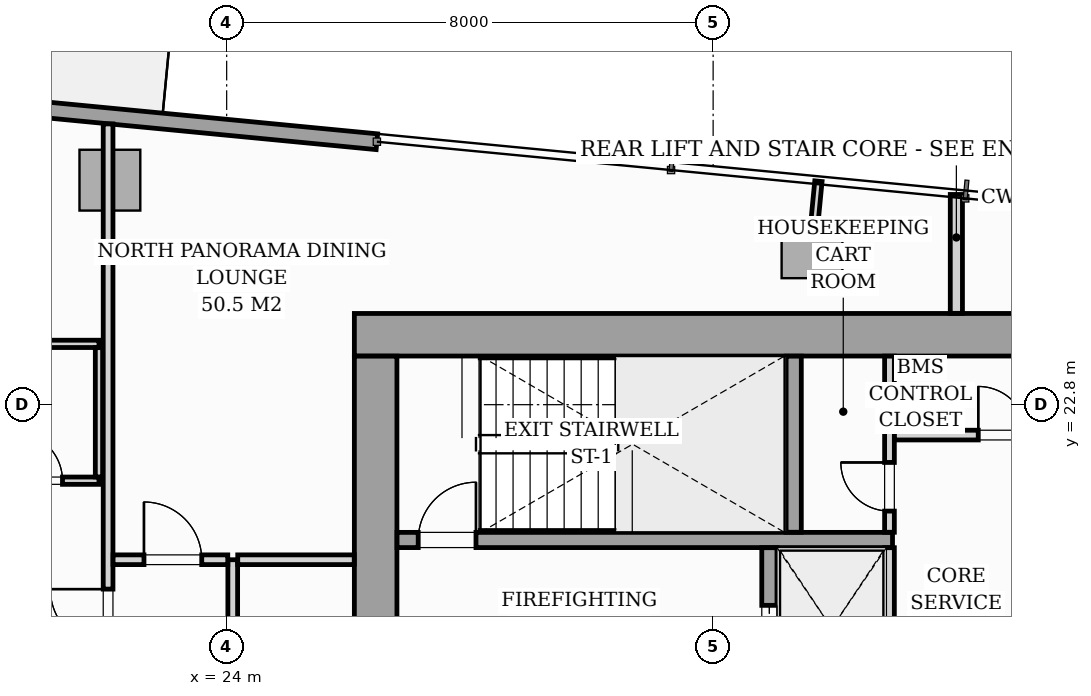
"""IFC4 building model, lengths in metres.
Left out: names, types, materials, properties, quantities, classifications, styles, units other than length and angle.
Written with IfcOpenShell. Run it as: python <this file> out.ifc"""

import sys

from ifc_helpers import new_model, si_unit, direction, frame, frame_2d, origin, origin_2d, place, context, subcontext, project, spatial, rectangle, i_section, extrude, source, transform, mapped, element, fill, save


model = new_model("IFC4")
c1 = context("Model", 3, precision=1e-05, world=origin(), true_north=direction((0.0, 1.0)))
c2 = subcontext(c1, "Body", "Model", "MODEL_VIEW")
j1 = project(units=[si_unit("LENGTHUNIT", "METRE"), si_unit("PLANEANGLEUNIT", "RADIAN")], contexts=[c1])
p1 = place(None, origin())
s1 = spatial("IfcSite", under=j1, at=p1, CompositionType="ELEMENT")
p2 = place(p1, origin())
s2 = spatial("IfcBuilding", under=s1, at=p2, CompositionType="ELEMENT")
p3 = place(p2, frame((0.0, 0.0, 156.6)))
s3 = spatial("IfcBuildingStorey", under=s2, at=p3, CompositionType="ELEMENT", Elevation=156.6)
m1 = source(origin(), c2, "Body", "SweptSolid", [
    extrude(i_section(OverallWidth=0.421, OverallDepth=0.465, WebThickness=0.045, FlangeThickness=0.073, FilletRadius=0.018, at=origin_2d()), origin(), (0.0, 0.0, 1.0), 3.196),
])
for number, where, z_axis, x_axis in (
    (1, (26.4, 24.0, 0.002), (0.0, 0.0, 1.0), (1.0, 0.0, 0.0)),
    (2, (33.12, 24.0, 0.002), (0.0, 0.0, 1.0), (1.0, 0.0, 0.0)),
):
    element("IfcColumn", number, at=place(p3, frame(where, z_axis=z_axis, x_axis=x_axis)), inside=s3, PredefinedType="PILASTER", context=c2, shape_type="MappedRepresentation", body=[
        mapped(m1, transform((0.0, 0.0, 0.0), scale=1.0)),
    ])
m2 = source(origin(), c2, "Body", "SweptSolid", [
    extrude(rectangle(XDim=1.0, YDim=1.0, at=origin_2d()), origin(), (0.0, 0.0, 1.0), 3.196),
])
for number, where, z_axis, x_axis in (
    (3, (22.08, 26.492, 0.002), (0.0, 0.0, 1.0), (0.995, -0.096, 0.0)),
    (4, (33.626, 25.38, 0.002), (0.0, 0.0, 1.0), (0.995, -0.096, 0.0)),
):
    element("IfcColumn", number, at=place(p3, frame(where, z_axis=z_axis, x_axis=x_axis)), inside=s3, PredefinedType="COLUMN", context=c2, shape_type="MappedRepresentation", body=[
        mapped(m2, transform((0.0, 0.0, 0.0), scale=1.0)),
    ])
p4 = place(p3, frame((9.539, 28.754, 0.0), z_axis=(0.0, 0.0, 1.0), x_axis=(0.995397345886, -0.09583383433, 0.0)))
e5 = element("IfcWall", 5, at=p4, inside=s3, PredefinedType="STANDARD", context=c2, shape_type="SweptSolid", body=[
    extrude(rectangle(XDim=17.01, YDim=0.26, at=frame_2d((8.505, 0.0))), origin(), (0.0, 0.0, 1.0), 2.94),
])
p5 = place(p4, frame((6.903, 0.0, 0.0)))
e6 = element("IfcOpeningElement", 6, at=p5, cuts=e5, PredefinedType="OPENING", context=c2, shape_type="SweptSolid", body=[
    extrude(rectangle(XDim=1.8, YDim=2.06, at=frame_2d((0.9, 1.03))), frame((0.0, 0.14, 0.0), z_axis=(0.0, -1.0, 0.0), x_axis=(1.0, 0.0, 0.0)), (0.0, 0.0, 1.0), 0.28),
])
p6 = place(p4, frame((2.05, 0.0, 0.65)))
e7 = element("IfcOpeningElement", 7, at=p6, cuts=e5, PredefinedType="OPENING", context=c2, shape_type="SweptSolid", body=[
    extrude(rectangle(XDim=1.6, YDim=1.5, at=frame_2d((0.8, 0.75))), frame((0.0, 0.14, 0.0), z_axis=(0.0, -1.0, 0.0), x_axis=(1.0, 0.0, 0.0)), (0.0, 0.0, 1.0), 0.28),
])
p7 = place(p3, frame((26.1, 23.95, 0.0), z_axis=(0.0, 0.0, 1.0), x_axis=(1.0, 0.0, 0.0)))
e8 = element("IfcWall", 8, at=p7, inside=s3, PredefinedType="SHEAR", context=c2, shape_type="SweptSolid", body=[
    extrude(rectangle(XDim=19.8, YDim=0.7, at=frame_2d((9.9, 0.0))), origin(), (0.0, 0.0, 1.0), 3.2),
])
p8 = place(p3, frame((26.45, 17.802, 0.0), z_axis=(0.0, 0.0, 1.0), x_axis=(0.0, 1.0, 0.0)))
e9 = element("IfcWall", 9, at=p8, inside=s3, PredefinedType="SHEAR", context=c2, shape_type="SweptSolid", body=[
    extrude(rectangle(XDim=5.796, YDim=0.7, at=frame_2d((2.898, 0.0))), origin(), (0.0, 0.0, 1.0), 3.2),
])
p9 = place(p3, frame((26.802, 20.575, 0.0), z_axis=(0.0, 0.0, 1.0), x_axis=(1.0, 0.0, 0.0)))
e10 = element("IfcWall", 10, at=p9, inside=s3, PredefinedType="SOLIDWALL", context=c2, shape_type="SweptSolid", body=[
    extrude(rectangle(XDim=8.148, YDim=0.25, at=frame_2d((4.074, 0.0))), origin(), (0.0, 0.0, 1.0), 3.2),
])
p10 = place(p9, frame((0.348, 0.0, 0.0)))
e11 = element("IfcOpeningElement", 11, at=p10, cuts=e10, PredefinedType="OPENING", context=c2, shape_type="SweptSolid", body=[
    extrude(rectangle(XDim=0.95, YDim=2.06, at=frame_2d((0.475, 1.03))), frame((0.0, 0.135, 0.0), z_axis=(0.0, -1.0, 0.0), x_axis=(1.0, 0.0, 0.0)), (0.0, 0.0, 1.0), 0.27),
])
p11 = place(p3, frame((33.325, 20.702, 0.0), z_axis=(0.0, 0.0, 1.0), x_axis=(0.0, 1.0, 0.0)))
e12 = element("IfcWall", 12, at=p11, inside=s3, PredefinedType="SOLIDWALL", context=c2, shape_type="SweptSolid", body=[
    extrude(rectangle(XDim=2.896, YDim=0.25, at=frame_2d((1.448, 0.0))), origin(), (0.0, 0.0, 1.0), 3.2),
])
p12 = place(p3, frame((32.925, 17.802, 0.0), z_axis=(0.0, 0.0, 1.0), x_axis=(0.0, 1.0, 0.0)))
e13 = element("IfcWall", 13, at=p12, inside=s3, PredefinedType="SOLIDWALL", context=c2, shape_type="SweptSolid", body=[
    extrude(rectangle(XDim=2.646, YDim=0.25, at=frame_2d((1.323, 0.0))), origin(), (0.0, 0.0, 1.0), 3.2),
])
p13 = place(p12, frame((0.598, 0.0, 0.0)))
e14 = element("IfcOpeningElement", 14, at=p13, cuts=e13, PredefinedType="OPENING", context=c2, shape_type="SweptSolid", body=[
    extrude(rectangle(XDim=1.1, YDim=2.08, at=frame_2d((0.55, 1.04))), frame((0.0, 0.135, 0.0), z_axis=(0.0, -1.0, 0.0), x_axis=(1.0, 0.0, 0.0)), (0.0, 0.0, 1.0), 0.27),
])
p14 = place(p3, frame((34.9, 17.802, 0.0), z_axis=(0.0, 0.0, 1.0), x_axis=(0.0, 1.0, 0.0)))
e15 = element("IfcWall", 15, at=p14, inside=s3, PredefinedType="PARTITIONING", context=c2, shape_type="SweptSolid", body=[
    extrude(rectangle(XDim=2.646, YDim=0.16, at=frame_2d((1.323, 0.0))), origin(), (0.0, 0.0, 1.0), 2.94),
])
p15 = place(p3, frame((34.9, 20.702, 0.0), z_axis=(0.0, 0.0, 1.0), x_axis=(0.0, 1.0, 0.0)))
e16 = element("IfcWall", 16, at=p15, inside=s3, PredefinedType="PARTITIONING", context=c2, shape_type="SweptSolid", body=[
    extrude(rectangle(XDim=2.896, YDim=0.16, at=frame_2d((1.448, 0.0))), origin(), (0.0, 0.0, 1.0), 2.94),
])
p16 = place(p15, frame((0.348, 0.0, 0.0)))
e17 = element("IfcOpeningElement", 17, at=p16, cuts=e16, PredefinedType="OPENING", context=c2, shape_type="SweptSolid", body=[
    extrude(rectangle(XDim=0.8, YDim=2.05, at=frame_2d((0.4, 1.025))), frame((0.0, 0.09, 0.0), z_axis=(0.0, -1.0, 0.0), x_axis=(1.0, 0.0, 0.0)), (0.0, 0.0, 1.0), 0.18),
])
p17 = place(p3, frame((34.982, 22.3, 0.0), z_axis=(0.0, 0.0, 1.0), x_axis=(1.0, 0.0, 0.0)))
e18 = element("IfcWall", 18, at=p17, inside=s3, PredefinedType="PARTITIONING", context=c2, shape_type="SweptSolid", body=[
    extrude(rectangle(XDim=3.566, YDim=0.16, at=frame_2d((1.783, 0.0))), origin(), (0.0, 0.0, 1.0), 2.94),
])
p18 = place(p17, frame((1.378, 0.0, 0.0)))
e19 = element("IfcOpeningElement", 19, at=p18, cuts=e18, PredefinedType="OPENING", context=c2, shape_type="SweptSolid", body=[
    extrude(rectangle(XDim=0.8, YDim=2.05, at=frame_2d((0.4, 1.025))), frame((0.0, 0.09, 0.0), z_axis=(0.0, -1.0, 0.0), x_axis=(1.0, 0.0, 0.0)), (0.0, 0.0, 1.0), 0.18),
])
p19 = place(p3, frame((22.05, 12.732, 0.0), z_axis=(0.0, 0.0, 1.0), x_axis=(0.0, 1.0, 0.0)))
e20 = element("IfcWall", 20, at=p19, inside=s3, PredefinedType="PARTITIONING", context=c2, shape_type="SweptSolid", body=[
    extrude(rectangle(XDim=14.685, YDim=0.16, at=frame_2d((7.343, 0.0))), origin(), (0.0, 0.0, 1.0), 2.94),
])
p20 = place(p19, frame((0.493, 0.0, 0.0)))
e21 = element("IfcOpeningElement", 21, at=p20, cuts=e20, PredefinedType="OPENING", context=c2, shape_type="SweptSolid", body=[
    extrude(rectangle(XDim=0.95, YDim=2.06, at=frame_2d((0.475, 1.03))), frame((0.0, 0.09, 0.0), z_axis=(0.0, -1.0, 0.0), x_axis=(1.0, 0.0, 0.0)), (0.0, 0.0, 1.0), 0.18),
])
p21 = place(p19, frame((6.085, 0.0, 0.0)))
e22 = element("IfcOpeningElement", 22, at=p21, cuts=e20, PredefinedType="OPENING", context=c2, shape_type="SweptSolid", body=[
    extrude(rectangle(XDim=0.95, YDim=2.06, at=frame_2d((0.475, 1.03))), frame((0.0, 0.09, 0.0), z_axis=(0.0, -1.0, 0.0), x_axis=(1.0, 0.0, 0.0)), (0.0, 0.0, 1.0), 0.18),
])
p22 = place(p3, frame((36.0, 24.302, 0.0), z_axis=(0.0, 0.0, 1.0), x_axis=(0.0, 1.0, 0.0)))
e23 = element("IfcWall", 23, at=p22, inside=s3, PredefinedType="PARTITIONING", context=c2, shape_type="SweptSolid", body=[
    extrude(rectangle(XDim=1.955, YDim=0.2, at=frame_2d((0.978, 0.0))), origin(), (0.0, 0.0, 1.0), 2.94),
])
p23 = place(p3, frame((17.7, 21.55, 0.0), z_axis=(0.0, 0.0, 1.0), x_axis=(1.0, 0.0, 0.0)))
e24 = element("IfcWall", 24, at=p23, inside=s3, PredefinedType="PARTITIONING", context=c2, shape_type="SweptSolid", body=[
    extrude(rectangle(XDim=4.2, YDim=0.12, at=frame_2d((2.1, 0.0))), origin(), (0.0, 0.0, 1.0), 2.94),
])
p24 = place(p23, frame((0.675, 0.0, 0.0)))
e25 = element("IfcOpeningElement", 25, at=p24, cuts=e24, PredefinedType="OPENING", context=c2, shape_type="SweptSolid", body=[
    extrude(rectangle(XDim=0.85, YDim=2.05, at=frame_2d((0.425, 1.025))), frame((0.0, 0.07, 0.0), z_axis=(0.0, -1.0, 0.0), x_axis=(1.0, 0.0, 0.0)), (0.0, 0.0, 1.0), 0.14),
])
p25 = place(p23, frame((2.8, 0.0, 0.0)))
e26 = element("IfcOpeningElement", 26, at=p25, cuts=e24, PredefinedType="OPENING", context=c2, shape_type="SweptSolid", body=[
    extrude(rectangle(XDim=0.8, YDim=2.02, at=frame_2d((0.4, 1.01))), frame((0.0, 0.07, 0.0), z_axis=(0.0, -1.0, 0.0), x_axis=(1.0, 0.0, 0.0)), (0.0, 0.0, 1.0), 0.14),
])
p26 = place(p3, frame((17.7, 23.8, 0.0), z_axis=(0.0, 0.0, 1.0), x_axis=(1.0, 0.0, 0.0)))
e27 = element("IfcWall", 27, at=p26, inside=s3, PredefinedType="PARTITIONING", context=c2, shape_type="SweptSolid", body=[
    extrude(rectangle(XDim=4.2, YDim=0.12, at=frame_2d((2.1, 0.0))), origin(), (0.0, 0.0, 1.0), 2.94),
])
p27 = place(p3, frame((21.9, 21.612, 0.0), z_axis=(0.0, 0.0, 1.0), x_axis=(0.0, 1.0, 0.0)))
e28 = element("IfcWall", 28, at=p27, inside=s3, PredefinedType="PARTITIONING", context=c2, shape_type="SweptSolid", body=[
    extrude(rectangle(XDim=2.126, YDim=0.12, at=frame_2d((1.063, 0.0))), origin(), (0.0, 0.0, 1.0), 2.94),
])
p28 = place(p3, frame((24.1, 14.66, 0.0), z_axis=(0.0, 0.0, 1.0), x_axis=(0.0, 1.0, 0.0)))
e29 = element("IfcWall", 29, at=p28, inside=s3, PredefinedType="PARTITIONING", context=c2, shape_type="SweptSolid", body=[
    extrude(rectangle(XDim=5.59, YDim=0.16, at=frame_2d((2.795, 0.0))), origin(), (0.0, 0.0, 1.0), 2.94),
])
p29 = place(p28, frame((2.36, 0.0, 0.0)))
e30 = element("IfcOpeningElement", 30, at=p29, cuts=e29, PredefinedType="OPENING", context=c2, shape_type="SweptSolid", body=[
    extrude(rectangle(XDim=0.85, YDim=2.0, at=frame_2d((0.425, 1.0))), frame((0.0, 0.09, 0.0), z_axis=(0.0, -1.0, 0.0), x_axis=(1.0, 0.0, 0.0)), (0.0, 0.0, 1.0), 0.18),
])
p30 = place(p3, frame((22.132, 20.25, 0.0), z_axis=(0.0, 0.0, 1.0), x_axis=(1.0, 0.0, 0.0)))
e31 = element("IfcWall", 31, at=p30, inside=s3, PredefinedType="PARTITIONING", context=c2, shape_type="SweptSolid", body=[
    extrude(rectangle(XDim=1.886, YDim=0.16, at=frame_2d((0.943, 0.0))), origin(), (0.0, 0.0, 1.0), 2.94),
])
p31 = place(p30, frame((0.508, 0.0, 0.0)))
e32 = element("IfcOpeningElement", 32, at=p31, cuts=e31, PredefinedType="OPENING", context=c2, shape_type="SweptSolid", body=[
    extrude(rectangle(XDim=0.95, YDim=2.06, at=frame_2d((0.475, 1.03))), frame((0.0, 0.09, 0.0), z_axis=(0.0, -1.0, 0.0), x_axis=(1.0, 0.0, 0.0)), (0.0, 0.0, 1.0), 0.18),
])
p32 = place(p3, frame((24.182, 20.25, 0.0), z_axis=(0.0, 0.0, 1.0), x_axis=(1.0, 0.0, 0.0)))
e33 = element("IfcWall", 33, at=p32, inside=s3, PredefinedType="PARTITIONING", context=c2, shape_type="SweptSolid", body=[
    extrude(rectangle(XDim=1.916, YDim=0.16, at=frame_2d((0.958, 0.0))), origin(), (0.0, 0.0, 1.0), 2.94),
])
p33 = place(p3, frame((33.663, 25.759, 0.0), z_axis=(0.0, 0.0, 1.0), x_axis=(0.095977354523, 0.995383517755, 0.0)))
e34 = element("IfcWall", 34, at=p33, inside=s3, PredefinedType="PARTITIONING", context=c2, shape_type="SweptSolid", body=[
    extrude(rectangle(XDim=0.72, YDim=0.12, at=frame_2d((0.36, 0.0))), origin(), (0.0, 0.0, 1.0), 2.94),
])
m3 = source(origin(), c2, "Body", "SweptSolid", [
    extrude(rectangle(XDim=0.95, YDim=2.06, at=frame_2d((0.475, 1.03))), frame((0.0, 0.025, 0.0), z_axis=(0.0, -1.0, 0.0), x_axis=(1.0, 0.0, 0.0)), (0.0, 0.0, 1.0), 0.05),
])
p34 = place(p10, origin())
e35 = element("IfcDoor", 35, at=p34, inside=s3, OperationType="SINGLE_SWING_RIGHT", PredefinedType="DOOR", context=c2, shape_type="MappedRepresentation", body=[
    mapped(m3, transform((0.0, 0.0, 0.0), scale=1.0)),
])
fill(e11, e35)
m4 = source(origin(), c2, "Body", "SweptSolid", [
    extrude(rectangle(XDim=1.1, YDim=2.08, at=frame_2d((0.55, 1.04))), frame((0.0, 0.025, 0.0), z_axis=(0.0, -1.0, 0.0), x_axis=(1.0, 0.0, 0.0)), (0.0, 0.0, 1.0), 0.05),
])
p35 = place(p13, origin())
e36 = element("IfcDoor", 36, at=p35, inside=s3, OperationType="SLIDING_TO_LEFT", PredefinedType="DOOR", context=c2, shape_type="MappedRepresentation", body=[
    mapped(m4, transform((0.0, 0.0, 0.0), scale=1.0)),
])
fill(e14, e36)
m5 = source(origin(), c2, "Body", "SweptSolid", [
    extrude(rectangle(XDim=0.8, YDim=2.05, at=frame_2d((0.4, 1.025))), frame((0.0, 0.025, 0.0), z_axis=(0.0, -1.0, 0.0), x_axis=(1.0, 0.0, 0.0)), (0.0, 0.0, 1.0), 0.05),
])
p36 = place(p16, origin())
e37 = element("IfcDoor", 37, at=p36, inside=s3, OperationType="SINGLE_SWING_RIGHT", PredefinedType="DOOR", context=c2, shape_type="MappedRepresentation", body=[
    mapped(m5, transform((0.0, 0.0, 0.0), scale=1.0)),
])
fill(e17, e37)
p37 = place(p18, origin())
e38 = element("IfcDoor", 38, at=p37, inside=s3, OperationType="SINGLE_SWING_LEFT", PredefinedType="DOOR", context=c2, shape_type="MappedRepresentation", body=[
    mapped(m5, transform((0.0, 0.0, 0.0), scale=1.0)),
])
fill(e19, e38)
m6 = source(origin(), c2, "Body", "SweptSolid", [
    extrude(rectangle(XDim=0.95, YDim=2.06, at=frame_2d((0.475, 1.03))), frame((0.0, 0.025, 0.0), z_axis=(0.0, -1.0, 0.0), x_axis=(1.0, 0.0, 0.0)), (0.0, 0.0, 1.0), 0.05),
])
p38 = place(p21, origin())
e39 = element("IfcDoor", 39, at=p38, inside=s3, OperationType="SINGLE_SWING_RIGHT", PredefinedType="DOOR", context=c2, shape_type="MappedRepresentation", body=[
    mapped(m6, transform((0.0, 0.0, 0.0), scale=1.0)),
])
fill(e22, e39)
m7 = source(origin(), c2, "Body", "SweptSolid", [
    extrude(rectangle(XDim=0.8, YDim=2.02, at=frame_2d((0.4, 1.01))), frame((0.0, 0.025, 0.0), z_axis=(0.0, -1.0, 0.0), x_axis=(1.0, 0.0, 0.0)), (0.0, 0.0, 1.0), 0.05),
])
p39 = place(p25, origin())
e40 = element("IfcDoor", 40, at=p39, inside=s3, OperationType="SINGLE_SWING_LEFT", PredefinedType="DOOR", context=c2, shape_type="MappedRepresentation", body=[
    mapped(m7, transform((0.0, 0.0, 0.0), scale=1.0)),
])
fill(e26, e40)
p40 = place(p31, origin())
e41 = element("IfcDoor", 41, at=p40, inside=s3, OperationType="SINGLE_SWING_LEFT", PredefinedType="DOOR", context=c2, shape_type="MappedRepresentation", body=[
    mapped(m6, transform((0.0, 0.0, 0.0), scale=1.0)),
])
fill(e32, e41)
save(model, sys.argv[1])
